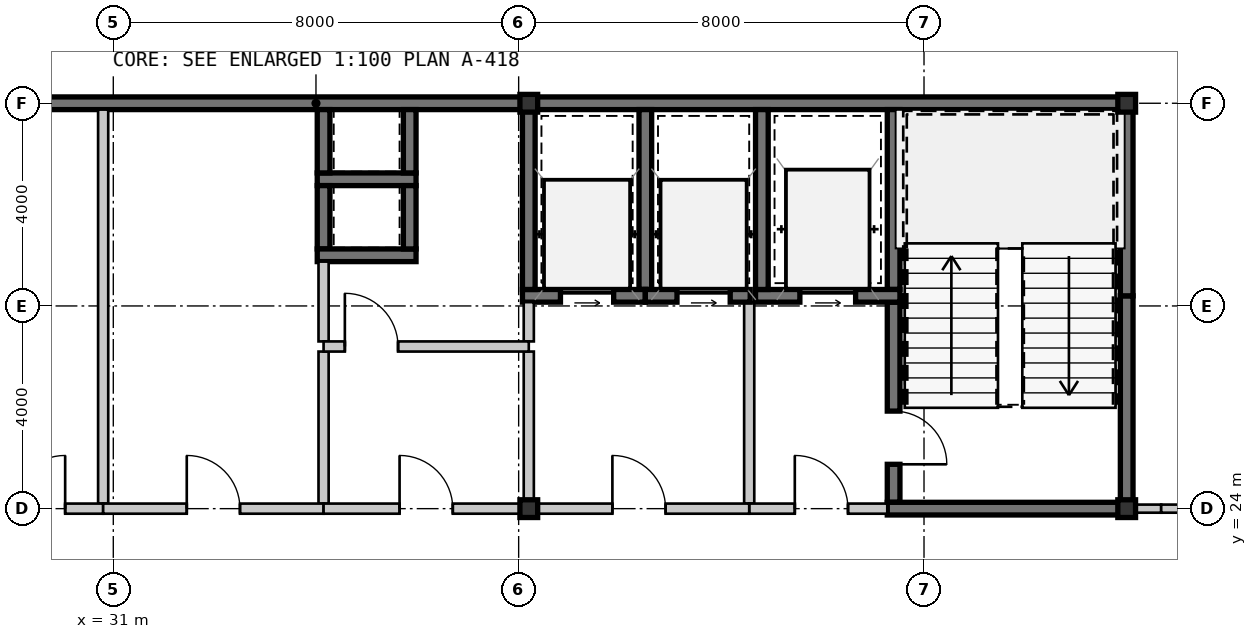
"""IFC4 building model, lengths in metres.
Left out: names, types, materials, properties, quantities, classifications, styles, units other than length and angle.
Written with IfcOpenShell. Run it as: python <this file> out.ifc"""

import sys

from ifc_helpers import new_model, si_unit, direction, frame, frame_2d, origin, origin_2d, place, context, subcontext, project, spatial, rectangle, hollow_rectangle, extrude, source, transform, mapped, element, fill, save


model = new_model("IFC4")
c1 = context("Model", 3, precision=1e-05, world=origin(), true_north=direction((0.0, 1.0)))
c2 = subcontext(c1, "Body", "Model", "MODEL_VIEW")
j1 = project(units=[si_unit("LENGTHUNIT", "METRE"), si_unit("PLANEANGLEUNIT", "RADIAN")], contexts=[c1])
p1 = place(None, origin())
s1 = spatial("IfcSite", under=j1, at=p1, CompositionType="ELEMENT")
p2 = place(p1, origin())
s2 = spatial("IfcBuilding", under=s1, at=p2, CompositionType="ELEMENT")
p3 = place(p2, frame((0.0, 0.0, 191.45)))
s3 = spatial("IfcBuildingStorey", under=s2, at=p3, CompositionType="ELEMENT", Elevation=191.45)
m1 = source(origin(), c2, "Body", "SweptSolid", [
    extrude(hollow_rectangle(XDim=0.35, YDim=0.35, WallThickness=0.016, at=origin_2d()), origin(), (0.0, 0.0, 1.0), 3.15),
])
for number, where, z_axis, x_axis in (
    (1, (39.2, 24.0, 0.0), (0.0, 0.0, 1.0), (1.0, 0.0, 0.0)),
    (2, (51.0, 24.0, 0.0), (0.0, 0.0, 1.0), (1.0, 0.0, 0.0)),
    (3, (39.2, 32.0, 0.0), (0.0, 0.0, 1.0), (1.0, 0.0, 0.0)),
    (4, (51.0, 32.0, 0.0), (0.0, 0.0, 1.0), (1.0, 0.0, 0.0)),
):
    element("IfcColumn", number, at=place(p3, frame(where, z_axis=z_axis, x_axis=x_axis)), inside=s3, PredefinedType="COLUMN", context=c2, shape_type="MappedRepresentation", body=[
        mapped(m1, transform((0.0, 0.0, 0.0), scale=1.0)),
    ])
m2 = source(origin(), c2, "Body", "SweptSolid", [
    extrude(rectangle(XDim=11.2, YDim=0.25, at=frame_2d((5.6, 0.0))), origin(), (0.0, 0.0, 1.0), 2.93),
])
p4 = place(p3, frame((28.0, 32.0, 0.0), z_axis=(0.0, 0.0, 1.0), x_axis=(1.0, 0.0, 0.0)))
e5 = element("IfcWall", 5, at=p4, inside=s3, PredefinedType="SHEAR", context=c2, shape_type="MappedRepresentation", body=[
    mapped(m2, transform((0.0, 0.0, 0.0), scale=1.0)),
])
m3 = source(origin(), c2, "Body", "SweptSolid", [
    extrude(rectangle(XDim=11.925, YDim=0.25, at=frame_2d((5.962, 0.0))), origin(), (0.0, 0.0, 1.0), 2.93),
])
p5 = place(p3, frame((39.2, 32.0, 0.0), z_axis=(0.0, 0.0, 1.0), x_axis=(1.0, 0.0, 0.0)))
e6 = element("IfcWall", 6, at=p5, inside=s3, PredefinedType="SHEAR", context=c2, shape_type="MappedRepresentation", body=[
    mapped(m3, transform((0.0, 0.0, 0.0), scale=1.0)),
])
m4 = source(origin(), c2, "Body", "SweptSolid", [
    extrude(rectangle(XDim=4.075, YDim=0.25, at=frame_2d((2.038, 0.0))), origin(), (0.0, 0.0, 1.0), 2.93),
])
p6 = place(p3, frame((51.0, 24.125, 0.0), z_axis=(0.0, 0.0, 1.0), x_axis=(0.0, 1.0, 0.0)))
e7 = element("IfcWall", 7, at=p6, inside=s3, PredefinedType="SHEAR", context=c2, shape_type="MappedRepresentation", body=[
    mapped(m4, transform((0.0, 0.0, 0.0), scale=1.0)),
])
m5 = source(origin(), c2, "Body", "SweptSolid", [
    extrude(rectangle(XDim=3.675, YDim=0.25, at=frame_2d((1.837, 0.0))), origin(), (0.0, 0.0, 1.0), 2.93),
])
p7 = place(p3, frame((51.0, 28.2, 0.0), z_axis=(0.0, 0.0, 1.0), x_axis=(0.0, 1.0, 0.0)))
e8 = element("IfcWall", 8, at=p7, inside=s3, PredefinedType="SHEAR", context=c2, shape_type="MappedRepresentation", body=[
    mapped(m5, transform((0.0, 0.0, 0.0), scale=1.0)),
])
m6 = source(origin(), c2, "Body", "SweptSolid", [
    extrude(rectangle(XDim=3.55, YDim=0.25, at=frame_2d((1.775, 0.0))), origin(), (0.0, 0.0, 1.0), 2.93),
])
p8 = place(p3, frame((46.4, 31.875, 0.0), z_axis=(0.0, 0.0, 1.0), x_axis=(0.0, -1.0, 0.0)))
e9 = element("IfcWall", 9, at=p8, inside=s3, PredefinedType="SHEAR", context=c2, shape_type="MappedRepresentation", body=[
    mapped(m6, transform((0.0, 0.0, 0.0), scale=1.0)),
])
m7 = source(origin(), c2, "Body", "SweptSolid", [
    extrude(rectangle(XDim=3.95, YDim=0.25, at=frame_2d((1.975, 0.0))), origin(), (0.0, 0.0, 1.0), 2.93),
])
p9 = place(p3, frame((46.4, 28.075, 0.0), z_axis=(0.0, 0.0, 1.0), x_axis=(0.0, -1.0, 0.0)))
e10 = element("IfcWall", 10, at=p9, inside=s3, PredefinedType="SHEAR", context=c2, shape_type="MappedRepresentation", body=[
    mapped(m7, transform((0.0, 0.0, 0.0), scale=1.0)),
])
m8 = source(origin(), c2, "Body", "SweptSolid", [
    extrude(rectangle(XDim=1.05, YDim=2.1, at=frame_2d((0.525, 1.05))), frame((0.0, 0.135, 0.0), z_axis=(0.0, -1.0, 0.0), x_axis=(1.0, 0.0, 0.0)), (0.0, 0.0, 1.0), 0.27),
])
p10 = place(p9, frame((2.15, 0.0, 0.0)))
e11 = element("IfcOpeningElement", 11, at=p10, cuts=e10, PredefinedType="OPENING", context=c2, shape_type="MappedRepresentation", body=[
    mapped(m8, transform((0.0, 0.0, 0.0), scale=1.0)),
])
m9 = source(origin(), c2, "Body", "SweptSolid", [
    extrude(rectangle(XDim=4.85, YDim=0.25, at=frame_2d((2.425, 0.0))), origin(), (0.0, 0.0, 1.0), 2.93),
])
p11 = place(p3, frame((46.275, 24.0, 0.0), z_axis=(0.0, 0.0, 1.0), x_axis=(1.0, 0.0, 0.0)))
e12 = element("IfcWall", 12, at=p11, inside=s3, PredefinedType="SHEAR", context=c2, shape_type="MappedRepresentation", body=[
    mapped(m9, transform((0.0, 0.0, 0.0), scale=1.0)),
])
m10 = source(origin(), c2, "Body", "SweptSolid", [
    extrude(rectangle(XDim=2.85, YDim=0.25, at=frame_2d((1.425, 0.0))), origin(), (0.0, 0.0, 1.0), 2.93),
])
p12 = place(p3, frame((43.675, 28.2, 0.0), z_axis=(0.0, 0.0, 1.0), x_axis=(1.0, 0.0, 0.0)))
e13 = element("IfcWall", 13, at=p12, inside=s3, PredefinedType="SHEAR", context=c2, shape_type="MappedRepresentation", body=[
    mapped(m10, transform((0.0, 0.0, 0.0), scale=1.0)),
])
m11 = source(origin(), c2, "Body", "SweptSolid", [
    extrude(rectangle(XDim=1.1, YDim=2.15, at=frame_2d((0.55, 1.075))), frame((0.0, 0.135, 0.0), z_axis=(0.0, -1.0, 0.0), x_axis=(1.0, 0.0, 0.0)), (0.0, 0.0, 1.0), 0.27),
])
p13 = place(p12, frame((0.875, 0.0, 0.0)))
e14 = element("IfcOpeningElement", 14, at=p13, cuts=e13, PredefinedType="OPENING", context=c2, shape_type="MappedRepresentation", body=[
    mapped(m11, transform((0.0, 0.0, 0.0), scale=1.0)),
])
p14 = place(p3, frame((43.8, 31.875, 0.0), z_axis=(0.0, 0.0, 1.0), x_axis=(0.0, -1.0, 0.0)))
e15 = element("IfcWall", 15, at=p14, inside=s3, PredefinedType="SHEAR", context=c2, shape_type="MappedRepresentation", body=[
    mapped(m6, transform((0.0, 0.0, 0.0), scale=1.0)),
])
m12 = source(origin(), c2, "Body", "SweptSolid", [
    extrude(rectangle(XDim=3.975, YDim=0.2, at=frame_2d((1.987, 0.0))), origin(), (0.0, 0.0, 1.0), 2.93),
])
p15 = place(p3, frame((43.55, 28.075, 0.0), z_axis=(0.0, 0.0, 1.0), x_axis=(0.0, -1.0, 0.0)))
e16 = element("IfcWall", 16, at=p15, inside=s3, PredefinedType="SOLIDWALL", context=c2, shape_type="MappedRepresentation", body=[
    mapped(m12, transform((0.0, 0.0, 0.0), scale=1.0)),
])
m13 = source(origin(), c2, "Body", "SweptSolid", [
    extrude(rectangle(XDim=2.725, YDim=0.2, at=frame_2d((1.362, 0.0))), origin(), (0.0, 0.0, 1.0), 2.397),
])
p16 = place(p3, frame((43.55, 24.0, 0.0), z_axis=(0.0, 0.0, 1.0), x_axis=(1.0, 0.0, 0.0)))
e17 = element("IfcWall", 17, at=p16, inside=s3, PredefinedType="SOLIDWALL", context=c2, shape_type="MappedRepresentation", body=[
    mapped(m13, transform((0.0, 0.0, 0.0), scale=1.0)),
])
m14 = source(origin(), c2, "Body", "SweptSolid", [
    extrude(rectangle(XDim=1.05, YDim=2.1, at=frame_2d((0.525, 1.05))), frame((0.0, 0.11, 0.0), z_axis=(0.0, -1.0, 0.0), x_axis=(1.0, 0.0, 0.0)), (0.0, 0.0, 1.0), 0.22),
])
p17 = place(p16, frame((0.9, 0.0, 0.0)))
e18 = element("IfcOpeningElement", 18, at=p17, cuts=e17, PredefinedType="OPENING", context=c2, shape_type="MappedRepresentation", body=[
    mapped(m14, transform((0.0, 0.0, 0.0), scale=1.0)),
])
m15 = source(origin(), c2, "Body", "SweptSolid", [
    extrude(rectangle(XDim=1.95, YDim=0.25, at=frame_2d((0.975, 0.0))), origin(), (0.0, 0.0, 1.0), 2.93),
])
p18 = place(p3, frame((35.025, 30.5, 0.0), z_axis=(0.0, 0.0, 1.0), x_axis=(1.0, 0.0, 0.0)))
e19 = element("IfcWall", 19, at=p18, inside=s3, PredefinedType="SHEAR", context=c2, shape_type="MappedRepresentation", body=[
    mapped(m15, transform((0.0, 0.0, 0.0), scale=1.0)),
])
m16 = source(origin(), c2, "Body", "SweptSolid", [
    extrude(rectangle(XDim=1.25, YDim=0.25, at=frame_2d((0.625, 0.0))), origin(), (0.0, 0.0, 1.0), 2.93),
])
for number, where, z_axis, x_axis in (
    (20, (35.15, 31.875, 0.0), (0.0, 0.0, 1.0), (0.0, -1.0, 0.0)),
    (21, (36.85, 30.625, 0.0), (0.0, 0.0, 1.0), (0.0, 1.0, 0.0)),
    (22, (35.15, 30.375, 0.0), (0.0, 0.0, 1.0), (0.0, -1.0, 0.0)),
):
    element("IfcWall", number, at=place(p3, frame(where, z_axis=z_axis, x_axis=x_axis)), inside=s3, PredefinedType="SHEAR", context=c2, shape_type="MappedRepresentation", body=[
        mapped(m16, transform((0.0, 0.0, 0.0), scale=1.0)),
    ])
p19 = place(p3, frame((35.025, 29.0, 0.0), z_axis=(0.0, 0.0, 1.0), x_axis=(1.0, 0.0, 0.0)))
e23 = element("IfcWall", 23, at=p19, inside=s3, PredefinedType="SHEAR", context=c2, shape_type="MappedRepresentation", body=[
    mapped(m15, transform((0.0, 0.0, 0.0), scale=1.0)),
])
p20 = place(p3, frame((36.85, 29.125, 0.0), z_axis=(0.0, 0.0, 1.0), x_axis=(0.0, 1.0, 0.0)))
e24 = element("IfcWall", 24, at=p20, inside=s3, PredefinedType="SHEAR", context=c2, shape_type="MappedRepresentation", body=[
    mapped(m16, transform((0.0, 0.0, 0.0), scale=1.0)),
])
p21 = place(p3, frame((41.5, 28.325, 0.0), z_axis=(0.0, 0.0, 1.0), x_axis=(0.0, 1.0, 0.0)))
e25 = element("IfcWall", 25, at=p21, inside=s3, PredefinedType="SHEAR", context=c2, shape_type="MappedRepresentation", body=[
    mapped(m6, transform((0.0, 0.0, 0.0), scale=1.0)),
])
m17 = source(origin(), c2, "Body", "SweptSolid", [
    extrude(rectangle(XDim=2.425, YDim=0.25, at=frame_2d((1.212, 0.0))), origin(), (0.0, 0.0, 1.0), 2.93),
])
p22 = place(p3, frame((39.075, 28.2, 0.0), z_axis=(0.0, 0.0, 1.0), x_axis=(1.0, 0.0, 0.0)))
e26 = element("IfcWall", 26, at=p22, inside=s3, PredefinedType="SHEAR", context=c2, shape_type="MappedRepresentation", body=[
    mapped(m17, transform((0.0, 0.0, 0.0), scale=1.0)),
])
m18 = source(origin(), c2, "Body", "SweptSolid", [
    extrude(rectangle(XDim=1.05, YDim=2.15, at=frame_2d((0.525, 1.075))), frame((0.0, 0.135, 0.0), z_axis=(0.0, -1.0, 0.0), x_axis=(1.0, 0.0, 0.0)), (0.0, 0.0, 1.0), 0.27),
])
p23 = place(p22, frame((0.75, 0.0, 0.0)))
e27 = element("IfcOpeningElement", 27, at=p23, cuts=e26, PredefinedType="OPENING", context=c2, shape_type="MappedRepresentation", body=[
    mapped(m18, transform((0.0, 0.0, 0.0), scale=1.0)),
])
p24 = place(p3, frame((39.2, 31.875, 0.0), z_axis=(0.0, 0.0, 1.0), x_axis=(0.0, -1.0, 0.0)))
e28 = element("IfcWall", 28, at=p24, inside=s3, PredefinedType="SHEAR", context=c2, shape_type="MappedRepresentation", body=[
    mapped(m6, transform((0.0, 0.0, 0.0), scale=1.0)),
])
m19 = source(origin(), c2, "Body", "SweptSolid", [
    extrude(rectangle(XDim=2.07, YDim=0.25, at=frame_2d((1.035, 0.0))), origin(), (0.0, 0.0, 1.0), 2.93),
])
p25 = place(p3, frame((41.5, 28.2, 0.0), z_axis=(0.0, 0.0, 1.0), x_axis=(1.0, 0.0, 0.0)))
e29 = element("IfcWall", 29, at=p25, inside=s3, PredefinedType="SHEAR", context=c2, shape_type="MappedRepresentation", body=[
    mapped(m19, transform((0.0, 0.0, 0.0), scale=1.0)),
])
p26 = place(p25, frame((0.625, 0.0, 0.0)))
e30 = element("IfcOpeningElement", 30, at=p26, cuts=e29, PredefinedType="OPENING", context=c2, shape_type="MappedRepresentation", body=[
    mapped(m18, transform((0.0, 0.0, 0.0), scale=1.0)),
])
m20 = source(origin(), c2, "Body", "SweptSolid", [
    extrude(rectangle(XDim=3.0, YDim=0.2, at=frame_2d((1.5, 0.0))), origin(), (0.0, 0.0, 1.0), 2.47),
])
p27 = place(p3, frame((39.2, 24.1, 0.0), z_axis=(0.0, 0.0, 1.0), x_axis=(0.0, 1.0, 0.0)))
e31 = element("IfcWall", 31, at=p27, inside=s3, PredefinedType="SOLIDWALL", context=c2, shape_type="MappedRepresentation", body=[
    mapped(m20, transform((0.0, 0.0, 0.0), scale=1.0)),
])
m21 = source(origin(), c2, "Body", "SweptSolid", [
    extrude(rectangle(XDim=0.775, YDim=0.2, at=frame_2d((0.387, 0.0))), origin(), (0.0, 0.0, 1.0), 2.47),
])
p28 = place(p3, frame((39.2, 27.3, 0.0), z_axis=(0.0, 0.0, 1.0), x_axis=(0.0, 1.0, 0.0)))
e32 = element("IfcWall", 32, at=p28, inside=s3, PredefinedType="SOLIDWALL", context=c2, shape_type="MappedRepresentation", body=[
    mapped(m21, transform((0.0, 0.0, 0.0), scale=1.0)),
])
m22 = source(origin(), c2, "Body", "SweptSolid", [
    extrude(rectangle(XDim=4.35, YDim=0.2, at=frame_2d((2.175, 0.0))), origin(), (0.0, 0.0, 1.0), 2.397),
])
p29 = place(p3, frame((43.55, 24.0, 0.0), z_axis=(0.0, 0.0, 1.0), x_axis=(-1.0, 0.0, 0.0)))
e33 = element("IfcWall", 33, at=p29, inside=s3, PredefinedType="SOLIDWALL", context=c2, shape_type="MappedRepresentation", body=[
    mapped(m22, transform((0.0, 0.0, 0.0), scale=1.0)),
])
p30 = place(p29, frame((1.65, 0.0, 0.0)))
e34 = element("IfcOpeningElement", 34, at=p30, cuts=e33, PredefinedType="OPENING", context=c2, shape_type="MappedRepresentation", body=[
    mapped(m14, transform((0.0, 0.0, 0.0), scale=1.0)),
])
m23 = source(origin(), c2, "Body", "SweptSolid", [
    extrude(rectangle(XDim=7.775, YDim=0.2, at=frame_2d((3.887, 0.0))), origin(), (0.0, 0.0, 1.0), 2.93),
])
p31 = place(p3, frame((30.8, 31.875, 0.0), z_axis=(0.0, 0.0, 1.0), x_axis=(0.0, -1.0, 0.0)))
e35 = element("IfcWall", 35, at=p31, inside=s3, PredefinedType="SOLIDWALL", context=c2, shape_type="MappedRepresentation", body=[
    mapped(m23, transform((0.0, 0.0, 0.0), scale=1.0)),
])
m24 = source(origin(), c2, "Body", "SweptSolid", [
    extrude(rectangle(XDim=4.35, YDim=0.2, at=frame_2d((2.175, 0.0))), origin(), (0.0, 0.0, 1.0), 2.47),
])
p32 = place(p3, frame((30.8, 24.0, 0.0), z_axis=(0.0, 0.0, 1.0), x_axis=(-1.0, 0.0, 0.0)))
e36 = element("IfcWall", 36, at=p32, inside=s3, PredefinedType="SOLIDWALL", context=c2, shape_type="MappedRepresentation", body=[
    mapped(m24, transform((0.0, 0.0, 0.0), scale=1.0)),
])
p33 = place(p32, frame((0.75, 0.0, 0.0)))
e37 = element("IfcOpeningElement", 37, at=p33, cuts=e36, PredefinedType="OPENING", context=c2, shape_type="MappedRepresentation", body=[
    mapped(m14, transform((0.0, 0.0, 0.0), scale=1.0)),
])
m25 = source(origin(), c2, "Body", "SweptSolid", [
    extrude(rectangle(XDim=3.0, YDim=0.2, at=frame_2d((1.5, 0.0))), origin(), (0.0, 0.0, 1.0), 2.93),
])
p34 = place(p3, frame((35.15, 27.1, 0.0), z_axis=(0.0, 0.0, 1.0), x_axis=(0.0, -1.0, 0.0)))
e38 = element("IfcWall", 38, at=p34, inside=s3, PredefinedType="SOLIDWALL", context=c2, shape_type="MappedRepresentation", body=[
    mapped(m25, transform((0.0, 0.0, 0.0), scale=1.0)),
])
m26 = source(origin(), c2, "Body", "SweptSolid", [
    extrude(rectangle(XDim=1.575, YDim=0.2, at=frame_2d((0.788, 0.0))), origin(), (0.0, 0.0, 1.0), 2.93),
])
p35 = place(p3, frame((35.15, 28.875, 0.0), z_axis=(0.0, 0.0, 1.0), x_axis=(0.0, -1.0, 0.0)))
e39 = element("IfcWall", 39, at=p35, inside=s3, PredefinedType="SOLIDWALL", context=c2, shape_type="MappedRepresentation", body=[
    mapped(m26, transform((0.0, 0.0, 0.0), scale=1.0)),
])
m27 = source(origin(), c2, "Body", "SweptSolid", [
    extrude(rectangle(XDim=4.35, YDim=0.2, at=frame_2d((2.175, 0.0))), origin(), (0.0, 0.0, 1.0), 2.47),
])
p36 = place(p3, frame((35.15, 24.0, 0.0), z_axis=(0.0, 0.0, 1.0), x_axis=(-1.0, 0.0, 0.0)))
e40 = element("IfcWall", 40, at=p36, inside=s3, PredefinedType="SOLIDWALL", context=c2, shape_type="MappedRepresentation", body=[
    mapped(m27, transform((0.0, 0.0, 0.0), scale=1.0)),
])
p37 = place(p36, frame((1.65, 0.0, 0.0)))
e41 = element("IfcOpeningElement", 41, at=p37, cuts=e40, PredefinedType="OPENING", context=c2, shape_type="MappedRepresentation", body=[
    mapped(m14, transform((0.0, 0.0, 0.0), scale=1.0)),
])
m28 = source(origin(), c2, "Body", "SweptSolid", [
    extrude(rectangle(XDim=4.05, YDim=0.2, at=frame_2d((2.025, 0.0))), origin(), (0.0, 0.0, 1.0), 2.93),
])
p38 = place(p3, frame((35.15, 27.2, 0.0), z_axis=(0.0, 0.0, 1.0), x_axis=(1.0, 0.0, 0.0)))
e42 = element("IfcWall", 42, at=p38, inside=s3, PredefinedType="SOLIDWALL", context=c2, shape_type="MappedRepresentation", body=[
    mapped(m28, transform((0.0, 0.0, 0.0), scale=1.0)),
])
p39 = place(p38, frame((0.42, 0.0, 0.0)))
e43 = element("IfcOpeningElement", 43, at=p39, cuts=e42, PredefinedType="OPENING", context=c2, shape_type="MappedRepresentation", body=[
    mapped(m14, transform((0.0, 0.0, 0.0), scale=1.0)),
])
m29 = source(origin(), c2, "Body", "SweptSolid", [
    extrude(rectangle(XDim=4.05, YDim=0.2, at=frame_2d((2.025, 0.0))), origin(), (0.0, 0.0, 1.0), 2.47),
])
p40 = place(p3, frame((39.2, 24.0, 0.0), z_axis=(0.0, 0.0, 1.0), x_axis=(-1.0, 0.0, 0.0)))
e44 = element("IfcWall", 44, at=p40, inside=s3, PredefinedType="SOLIDWALL", context=c2, shape_type="MappedRepresentation", body=[
    mapped(m29, transform((0.0, 0.0, 0.0), scale=1.0)),
])
p41 = place(p40, frame((1.5, 0.0, 0.0)))
e45 = element("IfcOpeningElement", 45, at=p41, cuts=e44, PredefinedType="OPENING", context=c2, shape_type="MappedRepresentation", body=[
    mapped(m14, transform((0.0, 0.0, 0.0), scale=1.0)),
])
m30 = source(origin(), c2, "Body", "SweptSolid", [
    extrude(rectangle(XDim=0.556, YDim=0.16, at=frame_2d((0.278, 0.0))), origin(), (0.0, 0.0, 1.0), 2.47),
])
p42 = place(p3, frame((51.125, 24.0, 0.0), z_axis=(0.0, 0.0, 1.0), x_axis=(1.0, 0.0, 0.0)))
e46 = element("IfcWall", 46, at=p42, inside=s3, PredefinedType="PARTITIONING", context=c2, shape_type="MappedRepresentation", body=[
    mapped(m30, transform((0.0, 0.0, 0.0), scale=1.0)),
])
m31 = source(origin(), c2, "Body", "SweptSolid", [
    extrude(rectangle(XDim=9.153, YDim=0.16, at=frame_2d((4.576, 0.0))), origin(), (0.0, 0.0, 1.0), 2.93),
])
p43 = place(p3, frame((51.681, 24.0, 0.0), z_axis=(0.0, 0.0, 1.0), x_axis=(1.0, 0.0, 0.0)))
e47 = element("IfcWall", 47, at=p43, inside=s3, PredefinedType="PARTITIONING", context=c2, shape_type="MappedRepresentation", body=[
    mapped(m31, transform((0.0, 0.0, 0.0), scale=1.0)),
])
m32 = source(origin(), c2, "Body", "SweptSolid", [
    extrude(rectangle(XDim=0.92, YDim=2.1, at=frame_2d((0.46, 1.05))), frame((0.0, 0.09, 0.0), z_axis=(0.0, -1.0, 0.0), x_axis=(1.0, 0.0, 0.0)), (0.0, 0.0, 1.0), 0.18),
])
p44 = place(p43, frame((3.786, 0.0, 0.0)))
e48 = element("IfcOpeningElement", 48, at=p44, cuts=e47, PredefinedType="OPENING", context=c2, shape_type="MappedRepresentation", body=[
    mapped(m32, transform((0.0, 0.0, 0.0), scale=1.0)),
])
m33 = source(origin(), c2, "Body", "SweptSolid", [
    extrude(rectangle(XDim=1.05, YDim=2.1, at=frame_2d((0.525, 1.05))), frame((0.0, 0.025, 0.0), z_axis=(0.0, -1.0, 0.0), x_axis=(1.0, 0.0, 0.0)), (0.0, 0.0, 1.0), 0.05),
])
p45 = place(p10, origin())
e49 = element("IfcDoor", 49, at=p45, inside=s3, OperationType="SINGLE_SWING_RIGHT", PredefinedType="DOOR", context=c2, shape_type="MappedRepresentation", body=[
    mapped(m33, transform((0.0, 0.0, 0.0), scale=1.0)),
])
fill(e11, e49)
m34 = source(origin(), c2, "Body", "SweptSolid", [
    extrude(rectangle(XDim=1.1, YDim=2.15, at=frame_2d((0.55, 1.075))), frame((0.0, 0.025, 0.0), z_axis=(0.0, -1.0, 0.0), x_axis=(1.0, 0.0, 0.0)), (0.0, 0.0, 1.0), 0.05),
])
p46 = place(p13, origin())
e50 = element("IfcDoor", 50, at=p46, inside=s3, OperationType="SLIDING_TO_LEFT", PredefinedType="DOOR", context=c2, shape_type="MappedRepresentation", body=[
    mapped(m34, transform((0.0, 0.0, 0.0), scale=1.0)),
])
fill(e14, e50)
p47 = place(p17, origin())
e51 = element("IfcDoor", 51, at=p47, inside=s3, OperationType="SINGLE_SWING_LEFT", PredefinedType="DOOR", context=c2, shape_type="MappedRepresentation", body=[
    mapped(m33, transform((0.0, 0.0, 0.0), scale=1.0)),
])
fill(e18, e51)
m35 = source(origin(), c2, "Body", "SweptSolid", [
    extrude(rectangle(XDim=1.05, YDim=2.15, at=frame_2d((0.525, 1.075))), frame((0.0, 0.025, 0.0), z_axis=(0.0, -1.0, 0.0), x_axis=(1.0, 0.0, 0.0)), (0.0, 0.0, 1.0), 0.05),
])
p48 = place(p23, origin())
e52 = element("IfcDoor", 52, at=p48, inside=s3, OperationType="SLIDING_TO_LEFT", PredefinedType="DOOR", context=c2, shape_type="MappedRepresentation", body=[
    mapped(m35, transform((0.0, 0.0, 0.0), scale=1.0)),
])
fill(e27, e52)
p49 = place(p26, origin())
e53 = element("IfcDoor", 53, at=p49, inside=s3, OperationType="SLIDING_TO_LEFT", PredefinedType="DOOR", context=c2, shape_type="MappedRepresentation", body=[
    mapped(m35, transform((0.0, 0.0, 0.0), scale=1.0)),
])
fill(e30, e53)
p50 = place(p30, frame((1.05, 0.0, 0.0), z_axis=(0.0, 0.0, 1.0), x_axis=(-1.0, 0.0, 0.0)))
e54 = element("IfcDoor", 54, at=p50, inside=s3, OperationType="SINGLE_SWING_LEFT", PredefinedType="DOOR", context=c2, shape_type="MappedRepresentation", body=[
    mapped(m33, transform((0.0, 0.0, 0.0), scale=1.0)),
])
fill(e34, e54)
p51 = place(p33, frame((1.05, 0.0, 0.0), z_axis=(0.0, 0.0, 1.0), x_axis=(-1.0, 0.0, 0.0)))
e55 = element("IfcDoor", 55, at=p51, inside=s3, OperationType="SINGLE_SWING_RIGHT", PredefinedType="DOOR", context=c2, shape_type="MappedRepresentation", body=[
    mapped(m33, transform((0.0, 0.0, 0.0), scale=1.0)),
])
fill(e37, e55)
p52 = place(p37, frame((1.05, 0.0, 0.0), z_axis=(0.0, 0.0, 1.0), x_axis=(-1.0, 0.0, 0.0)))
e56 = element("IfcDoor", 56, at=p52, inside=s3, OperationType="SINGLE_SWING_LEFT", PredefinedType="DOOR", context=c2, shape_type="MappedRepresentation", body=[
    mapped(m33, transform((0.0, 0.0, 0.0), scale=1.0)),
])
fill(e41, e56)
p53 = place(p39, origin())
e57 = element("IfcDoor", 57, at=p53, inside=s3, OperationType="SINGLE_SWING_LEFT", PredefinedType="DOOR", context=c2, shape_type="MappedRepresentation", body=[
    mapped(m33, transform((0.0, 0.0, 0.0), scale=1.0)),
])
fill(e43, e57)
p54 = place(p41, frame((1.05, 0.0, 0.0), z_axis=(0.0, 0.0, 1.0), x_axis=(-1.0, 0.0, 0.0)))
e58 = element("IfcDoor", 58, at=p54, inside=s3, OperationType="SINGLE_SWING_LEFT", PredefinedType="DOOR", context=c2, shape_type="MappedRepresentation", body=[
    mapped(m33, transform((0.0, 0.0, 0.0), scale=1.0)),
])
fill(e45, e58)
save(model, sys.argv[1])
